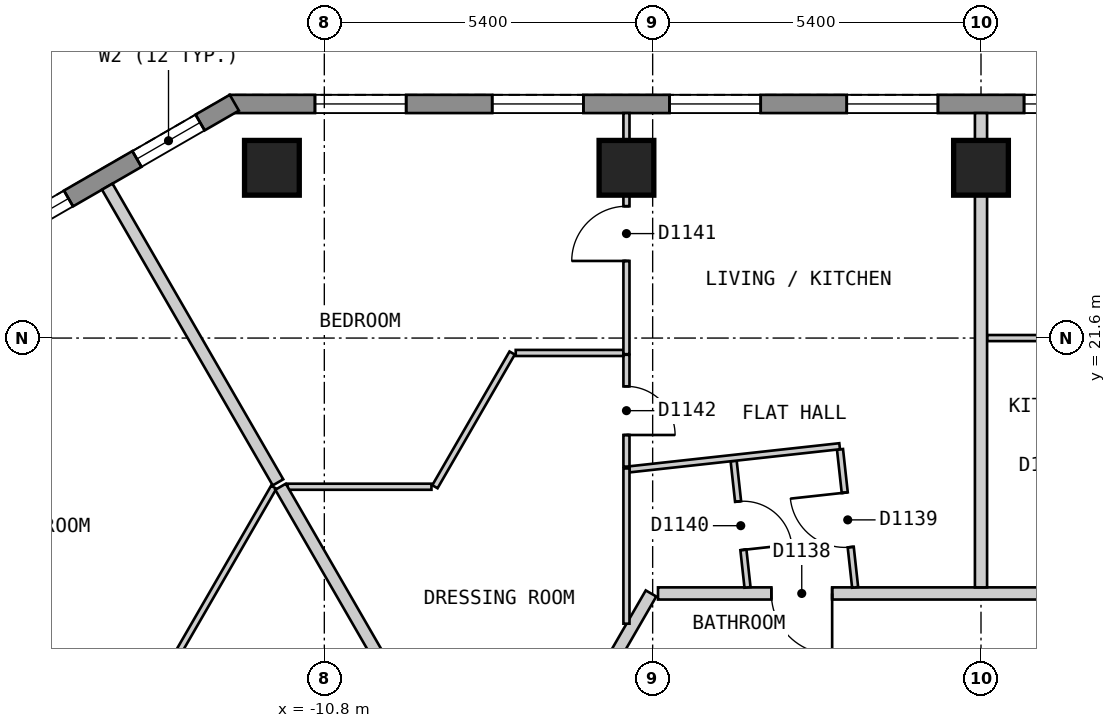
"""IFC4 building model, lengths in metres.
Left out: names, types, materials, properties, quantities, classifications, styles, units other than length and angle.
Written with IfcOpenShell. Run it as: python <this file> out.ifc"""

import sys

from ifc_helpers import new_model, si_unit, direction, frame, frame_2d, origin, origin_2d, place, context, subcontext, project, spatial, polyline, rectangle, outline, extrude, element, fill, save


model = new_model("IFC4")
c1 = context("Model", 3, precision=1e-05, world=origin(), true_north=direction((0.0, 1.0)))
c2 = subcontext(c1, "Body", "Model", "MODEL_VIEW")
j1 = project(units=[si_unit("LENGTHUNIT", "METRE"), si_unit("PLANEANGLEUNIT", "RADIAN")], contexts=[c1])
p1 = place(None, origin())
s1 = spatial("IfcSite", under=j1, at=p1, CompositionType="ELEMENT")
p2 = place(p1, origin())
s2 = spatial("IfcBuilding", under=s1, at=p2, CompositionType="ELEMENT")
p3 = place(p2, frame((0.0, 0.0, 150.6)))
s3 = spatial("IfcBuildingStorey", under=s2, at=p3, CompositionType="ELEMENT", Elevation=150.6)
for number, where, z_axis, x_axis in (
    (1, (0.0, 24.4, 0.0), (0.0, 0.0, 1.0), (-1.0, 0.0, 0.0)),
    (2, (-5.831, 24.4, 0.0), (0.0, 0.0, 1.0), (-1.0, 0.0, 0.0)),
    (3, (-11.662, 24.4, 0.0), (0.0, 0.0, 1.0), (-1.0, 0.0, 0.0)),
):
    element("IfcColumn", number, at=place(p3, frame(where, z_axis=z_axis, x_axis=x_axis)), inside=s3, PredefinedType="COLUMN", context=c2, shape_type="SweptSolid", body=[
        extrude(rectangle(XDim=0.9, YDim=0.9, at=origin_2d()), origin(), (0.0, 0.0, 1.0), 3.0),
    ])
p4 = place(p3, frame((12.355, 25.45, 0.0), z_axis=(0.0, 0.0, 1.0), x_axis=(-1.0, 0.0, 0.0)))
e4 = element("IfcWall", 4, at=p4, inside=s3, PredefinedType="SOLIDWALL", context=c2, shape_type="SweptSolid", body=[
    extrude(outline(polyline([(0.0, -0.15), (24.71, -0.15), (24.63, 0.15), (0.08, 0.15), (0.0, -0.15)])), origin(), (0.0, 0.0, 1.0), 2.6),
])
p5 = place(p4, frame((1.401, 0.0, 0.15)))
e5 = element("IfcOpeningElement", 5, at=p5, cuts=e4, PredefinedType="OPENING", context=c2, shape_type="SweptSolid", body=[
    extrude(rectangle(XDim=1.5, YDim=2.1, at=frame_2d((0.75, 1.05))), frame((0.0, 0.16, 0.0), z_axis=(0.0, -1.0, 0.0), x_axis=(1.0, 0.0, 0.0)), (0.0, 0.0, 1.0), 0.32),
])
p6 = place(p4, frame((4.316, 0.0, 0.15)))
e6 = element("IfcOpeningElement", 6, at=p6, cuts=e4, PredefinedType="OPENING", context=c2, shape_type="SweptSolid", body=[
    extrude(rectangle(XDim=1.5, YDim=2.1, at=frame_2d((0.75, 1.05))), frame((0.0, 0.16, 0.0), z_axis=(0.0, -1.0, 0.0), x_axis=(1.0, 0.0, 0.0)), (0.0, 0.0, 1.0), 0.32),
])
p7 = place(p4, frame((7.232, 0.0, 0.15)))
e7 = element("IfcOpeningElement", 7, at=p7, cuts=e4, PredefinedType="OPENING", context=c2, shape_type="SweptSolid", body=[
    extrude(rectangle(XDim=1.5, YDim=2.1, at=frame_2d((0.75, 1.05))), frame((0.0, 0.16, 0.0), z_axis=(0.0, -1.0, 0.0), x_axis=(1.0, 0.0, 0.0)), (0.0, 0.0, 1.0), 0.32),
])
p8 = place(p4, frame((10.147, 0.0, 0.15)))
e8 = element("IfcOpeningElement", 8, at=p8, cuts=e4, PredefinedType="OPENING", context=c2, shape_type="SweptSolid", body=[
    extrude(rectangle(XDim=1.5, YDim=2.1, at=frame_2d((0.75, 1.05))), frame((0.0, 0.16, 0.0), z_axis=(0.0, -1.0, 0.0), x_axis=(1.0, 0.0, 0.0)), (0.0, 0.0, 1.0), 0.32),
])
p9 = place(p4, frame((13.063, 0.0, 0.15)))
e9 = element("IfcOpeningElement", 9, at=p9, cuts=e4, PredefinedType="OPENING", context=c2, shape_type="SweptSolid", body=[
    extrude(rectangle(XDim=1.5, YDim=2.1, at=frame_2d((0.75, 1.05))), frame((0.0, 0.16, 0.0), z_axis=(0.0, -1.0, 0.0), x_axis=(1.0, 0.0, 0.0)), (0.0, 0.0, 1.0), 0.32),
])
p10 = place(p4, frame((15.978, 0.0, 0.15)))
e10 = element("IfcOpeningElement", 10, at=p10, cuts=e4, PredefinedType="OPENING", context=c2, shape_type="SweptSolid", body=[
    extrude(rectangle(XDim=1.5, YDim=2.1, at=frame_2d((0.75, 1.05))), frame((0.0, 0.16, 0.0), z_axis=(0.0, -1.0, 0.0), x_axis=(1.0, 0.0, 0.0)), (0.0, 0.0, 1.0), 0.32),
])
p11 = place(p4, frame((18.894, 0.0, 0.15)))
e11 = element("IfcOpeningElement", 11, at=p11, cuts=e4, PredefinedType="OPENING", context=c2, shape_type="SweptSolid", body=[
    extrude(rectangle(XDim=1.5, YDim=2.1, at=frame_2d((0.75, 1.05))), frame((0.0, 0.16, 0.0), z_axis=(0.0, -1.0, 0.0), x_axis=(1.0, 0.0, 0.0)), (0.0, 0.0, 1.0), 0.32),
])
p12 = place(p4, frame((21.809, 0.0, 0.15)))
e12 = element("IfcOpeningElement", 12, at=p12, cuts=e4, PredefinedType="OPENING", context=c2, shape_type="SweptSolid", body=[
    extrude(rectangle(XDim=1.5, YDim=2.1, at=frame_2d((0.75, 1.05))), frame((0.0, 0.16, 0.0), z_axis=(0.0, -1.0, 0.0), x_axis=(1.0, 0.0, 0.0)), (0.0, 0.0, 1.0), 0.32),
])
p13 = place(p3, frame((-12.28, 25.47, 0.0), z_axis=(0.0, 0.0, 1.0), x_axis=(-0.866022959057, -0.500004234368, 0.0)))
e13 = element("IfcWall", 13, at=p13, inside=s3, PredefinedType="SOLIDWALL", context=c2, shape_type="SweptSolid", body=[
    extrude(outline(polyline([(0.0, -0.15), (5.0, -0.15), (4.92, 0.15), (0.08, 0.15), (0.0, -0.15)])), origin(), (0.0, 0.0, 1.0), 2.6),
])
p14 = place(p13, frame((0.65, 0.0, 0.15)))
e14 = element("IfcOpeningElement", 14, at=p14, cuts=e13, PredefinedType="OPENING", context=c2, shape_type="SweptSolid", body=[
    extrude(rectangle(XDim=1.2, YDim=2.1, at=frame_2d((0.6, 1.05))), frame((0.0, 0.16, 0.0), z_axis=(0.0, -1.0, 0.0), x_axis=(1.0, 0.0, 0.0)), (0.0, 0.0, 1.0), 0.32),
])
p15 = place(p13, frame((3.149, 0.0, 0.15)))
e15 = element("IfcOpeningElement", 15, at=p15, cuts=e13, PredefinedType="OPENING", context=c2, shape_type="SweptSolid", body=[
    extrude(rectangle(XDim=1.2, YDim=2.1, at=frame_2d((0.6, 1.05))), frame((0.0, 0.16, 0.0), z_axis=(0.0, -1.0, 0.0), x_axis=(1.0, 0.0, 0.0)), (0.0, 0.0, 1.0), 0.32),
])
p16 = place(p3, frame((-5.312, 17.4, 0.0), z_axis=(0.0, 0.0, 1.0), x_axis=(1.0, 0.0, 0.0)))
e16 = element("IfcWall", 16, at=p16, inside=s3, PredefinedType="PARTITIONING", context=c2, shape_type="SweptSolid", body=[
    extrude(rectangle(XDim=10.739, YDim=0.2, at=frame_2d((5.37, 0.0))), origin(), (0.0, 0.0, 1.0), 2.6),
])
p17 = place(p16, frame((7.538, 0.0, 0.0)))
e17 = element("IfcOpeningElement", 17, at=p17, cuts=e16, PredefinedType="OPENING", context=c2, shape_type="SweptSolid", body=[
    extrude(rectangle(XDim=1.0, YDim=2.1, at=frame_2d((0.5, 1.05))), frame((0.0, 0.11, 0.0), z_axis=(0.0, -1.0, 0.0), x_axis=(1.0, 0.0, 0.0)), (0.0, 0.0, 1.0), 0.22),
])
p18 = place(p16, frame((1.864, 0.0, 0.0)))
e18 = element("IfcOpeningElement", 18, at=p18, cuts=e16, PredefinedType="OPENING", context=c2, shape_type="SweptSolid", body=[
    extrude(rectangle(XDim=1.0, YDim=2.1, at=frame_2d((0.5, 1.05))), frame((0.0, 0.11, 0.0), z_axis=(0.0, -1.0, 0.0), x_axis=(1.0, 0.0, 0.0)), (0.0, 0.0, 1.0), 0.22),
])
p19 = place(p3, frame((-6.697, 15.2, 0.0), z_axis=(0.0, 0.0, 1.0), x_axis=(0.499963722229, 0.866046347752, 0.0)))
e19 = element("IfcWall", 19, at=p19, inside=s3, PredefinedType="PARTITIONING", context=c2, shape_type="SweptSolid", body=[
    extrude(rectangle(XDim=2.54, YDim=0.2, at=frame_2d((1.27, 0.0))), origin(), (0.0, 0.0, 1.0), 2.6),
])
p20 = place(p3, frame((-2.319, 19.77, 0.0), z_axis=(0.0, 0.0, 1.0), x_axis=(0.109046821538, -0.994036614372, 0.0)))
e20 = element("IfcWall", 20, at=p20, inside=s3, PredefinedType="PARTITIONING", context=c2, shape_type="SweptSolid", body=[
    extrude(rectangle(XDim=2.284, YDim=0.1, at=frame_2d((1.142, 0.0))), origin(), (0.0, 0.0, 1.0), 2.6),
])
p21 = place(p20, frame((0.717, 0.0, 0.0)))
e21 = element("IfcOpeningElement", 21, at=p21, cuts=e20, PredefinedType="OPENING", context=c2, shape_type="SweptSolid", body=[
    extrude(rectangle(XDim=0.9, YDim=2.1, at=frame_2d((0.45, 1.05))), frame((0.0, 0.06, 0.0), z_axis=(0.0, -1.0, 0.0), x_axis=(1.0, 0.0, 0.0)), (0.0, 0.0, 1.0), 0.12),
])
p22 = place(p3, frame((-4.068, 19.579, 0.0), z_axis=(0.0, 0.0, 1.0), x_axis=(0.109022161139, -0.994039319333, 0.0)))
e22 = element("IfcWall", 22, at=p22, inside=s3, PredefinedType="PARTITIONING", context=c2, shape_type="SweptSolid", body=[
    extrude(rectangle(XDim=2.092, YDim=0.1, at=frame_2d((1.046, 0.0))), origin(), (0.0, 0.0, 1.0), 2.6),
])
p23 = place(p22, frame((0.671, 0.0, 0.0)))
e23 = element("IfcOpeningElement", 23, at=p23, cuts=e22, PredefinedType="OPENING", context=c2, shape_type="SweptSolid", body=[
    extrude(rectangle(XDim=0.8, YDim=2.1, at=frame_2d((0.4, 1.05))), frame((0.0, 0.06, 0.0), z_axis=(0.0, -1.0, 0.0), x_axis=(1.0, 0.0, 0.0)), (0.0, 0.0, 1.0), 0.12),
])
p24 = place(p3, frame((-5.831, 21.325, 0.0), z_axis=(0.0, 0.0, 1.0), x_axis=(0.0, -1.0, 0.0)))
e24 = element("IfcWall", 24, at=p24, inside=s3, PredefinedType="PARTITIONING", context=c2, shape_type="SweptSolid", body=[
    extrude(rectangle(XDim=1.839, YDim=0.1, at=frame_2d((0.919, 0.0))), origin(), (0.0, 0.0, 1.0), 2.6),
])
p25 = place(p24, frame((0.519, 0.0, 0.0)))
e25 = element("IfcOpeningElement", 25, at=p25, cuts=e24, PredefinedType="OPENING", context=c2, shape_type="SweptSolid", body=[
    extrude(rectangle(XDim=0.8, YDim=2.1, at=frame_2d((0.4, 1.05))), frame((0.0, 0.06, 0.0), z_axis=(0.0, -1.0, 0.0), x_axis=(1.0, 0.0, 0.0)), (0.0, 0.0, 1.0), 0.12),
])
p26 = place(p3, frame((-19.514, 17.599, 0.0), z_axis=(0.0, 0.0, 1.0), x_axis=(0.866007554612, -0.500030914399, 0.0)))
e26 = element("IfcWall", 26, at=p26, inside=s3, PredefinedType="PARTITIONING", context=c2, shape_type="SweptSolid", body=[
    extrude(rectangle(XDim=6.052, YDim=0.1, at=frame_2d((3.026, 0.0))), origin(), (0.0, 0.0, 1.0), 2.6),
])
p27 = place(p26, frame((2.576, 0.0, 0.0)))
e27 = element("IfcOpeningElement", 27, at=p27, cuts=e26, PredefinedType="OPENING", context=c2, shape_type="SweptSolid", body=[
    extrude(rectangle(XDim=0.9, YDim=2.1, at=frame_2d((0.45, 1.05))), frame((0.0, 0.06, 0.0), z_axis=(0.0, -1.0, 0.0), x_axis=(1.0, 0.0, 0.0)), (0.0, 0.0, 1.0), 0.12),
])
p28 = place(p3, frame((-11.405, 19.155, 0.0), z_axis=(0.0, 0.0, 1.0), x_axis=(1.0, 0.0, 0.0)))
e28 = element("IfcWall", 28, at=p28, inside=s3, PredefinedType="PARTITIONING", context=c2, shape_type="SweptSolid", body=[
    extrude(rectangle(XDim=2.367, YDim=0.1, at=frame_2d((1.184, 0.0))), origin(), (0.0, 0.0, 1.0), 2.6),
])
p29 = place(p3, frame((-7.652, 21.355, 0.0), z_axis=(0.0, 0.0, 1.0), x_axis=(1.0, 0.0, 0.0)))
e29 = element("IfcWall", 29, at=p29, inside=s3, PredefinedType="PARTITIONING", context=c2, shape_type="SweptSolid", body=[
    extrude(rectangle(XDim=1.771, YDim=0.1, at=frame_2d((0.885, 0.0))), origin(), (0.0, 0.0, 1.0), 2.6),
])
p30 = place(p3, frame((0.1, 21.6, 0.0), z_axis=(0.0, 0.0, 1.0), x_axis=(1.0, 0.0, 0.0)))
e30 = element("IfcWall", 30, at=p30, inside=s3, PredefinedType="PARTITIONING", context=c2, shape_type="SweptSolid", body=[
    extrude(rectangle(XDim=7.752, YDim=0.1, at=frame_2d((3.876, 0.0))), origin(), (0.0, 0.0, 1.0), 2.6),
])
p31 = place(p30, frame((2.634, 0.0, 0.0)))
e31 = element("IfcOpeningElement", 31, at=p31, cuts=e30, PredefinedType="OPENING", context=c2, shape_type="SweptSolid", body=[
    extrude(rectangle(XDim=0.9, YDim=2.1, at=frame_2d((0.45, 1.05))), frame((0.0, 0.06, 0.0), z_axis=(0.0, -1.0, 0.0), x_axis=(1.0, 0.0, 0.0)), (0.0, 0.0, 1.0), 0.12),
])
p32 = place(p3, frame((-8.981, 19.155, 0.0), z_axis=(0.0, 0.0, 1.0), x_axis=(0.500130227609, 0.865950203783, 0.0)))
e32 = element("IfcWall", 32, at=p32, inside=s3, PredefinedType="PARTITIONING", context=c2, shape_type="SweptSolid", body=[
    extrude(rectangle(XDim=2.539, YDim=0.1, at=frame_2d((1.27, 0.0))), origin(), (0.0, 0.0, 1.0), 2.6),
])
p33 = place(p3, frame((-22.398, 0.499, 0.0), z_axis=(0.0, 0.0, 1.0), x_axis=(0.499981561717, 0.866036048871, 0.0)))
e33 = element("IfcWall", 33, at=p33, inside=s3, PredefinedType="PARTITIONING", context=c2, shape_type="SweptSolid", body=[
    extrude(rectangle(XDim=21.532, YDim=0.1, at=frame_2d((10.766, 0.0))), origin(), (0.0, 0.0, 1.0), 2.6),
])
p34 = place(p33, frame((13.049, 0.0, 0.0)))
e34 = element("IfcOpeningElement", 34, at=p34, cuts=e33, PredefinedType="OPENING", context=c2, shape_type="SweptSolid", body=[
    extrude(rectangle(XDim=0.9, YDim=2.1, at=frame_2d((0.45, 1.05))), frame((0.0, 0.06, 0.0), z_axis=(0.0, -1.0, 0.0), x_axis=(1.0, 0.0, 0.0)), (0.0, 0.0, 1.0), 0.12),
])
p35 = place(p33, frame((2.183, 0.0, 0.0)))
e35 = element("IfcOpeningElement", 35, at=p35, cuts=e33, PredefinedType="OPENING", context=c2, shape_type="SweptSolid", body=[
    extrude(rectangle(XDim=0.8, YDim=2.1, at=frame_2d((0.4, 1.05))), frame((0.0, 0.06, 0.0), z_axis=(0.0, -1.0, 0.0), x_axis=(1.0, 0.0, 0.0)), (0.0, 0.0, 1.0), 0.12),
])
p36 = place(p3, frame((-5.781, 19.441, 0.0), z_axis=(0.0, 0.0, 1.0), x_axis=(0.994005576935, 0.109329378588, 0.0)))
e36 = element("IfcWall", 36, at=p36, inside=s3, PredefinedType="PARTITIONING", context=c2, shape_type="SweptSolid", body=[
    extrude(rectangle(XDim=3.477, YDim=0.1, at=frame_2d((1.738, 0.0))), origin(), (0.0, 0.0, 1.0), 2.6),
])
p37 = place(p3, frame((-5.831, 16.903, 0.0), z_axis=(0.0, 0.0, 1.0), x_axis=(0.0, 1.0, 0.0)))
e37 = element("IfcWall", 37, at=p37, inside=s3, PredefinedType="PARTITIONING", context=c2, shape_type="SweptSolid", body=[
    extrude(rectangle(XDim=2.553, YDim=0.1, at=frame_2d((1.276, 0.0))), origin(), (0.0, 0.0, 1.0), 2.6),
])
p38 = place(p3, frame((-5.831, 21.335, 0.0), z_axis=(0.0, 0.0, 1.0), x_axis=(0.0, 1.0, 0.0)))
e38 = element("IfcWall", 38, at=p38, inside=s3, PredefinedType="PARTITIONING", context=c2, shape_type="SweptSolid", body=[
    extrude(rectangle(XDim=3.965, YDim=0.1, at=frame_2d((1.982, 0.0))), origin(), (0.0, 0.0, 1.0), 2.6),
])
p39 = place(p38, frame((1.533, 0.0, 0.0)))
e39 = element("IfcOpeningElement", 39, at=p39, cuts=e38, PredefinedType="OPENING", context=c2, shape_type="SweptSolid", body=[
    extrude(rectangle(XDim=0.9, YDim=2.1, at=frame_2d((0.45, 1.05))), frame((0.0, 0.06, 0.0), z_axis=(0.0, -1.0, 0.0), x_axis=(1.0, 0.0, 0.0)), (0.0, 0.0, 1.0), 0.12),
])
p40 = place(p3, frame((-14.37, 24.09, 0.0), z_axis=(0.0, 0.0, 1.0), x_axis=(0.500057386422, -0.865992269183, 0.0)))
e40 = element("IfcWall", 40, at=p40, inside=s3, PredefinedType="PARTITIONING", context=c2, shape_type="SweptSolid", body=[
    extrude(rectangle(XDim=5.615, YDim=0.2, at=frame_2d((2.808, 0.0))), origin(), (0.0, 0.0, 1.0), 2.6),
])
p41 = place(p3, frame((-11.52, 19.155, 0.0), z_axis=(0.0, 0.0, 1.0), x_axis=(0.499916824138, -0.866073420066, 0.0)))
e41 = element("IfcWall", 41, at=p41, inside=s3, PredefinedType="PARTITIONING", context=c2, shape_type="SweptSolid", body=[
    extrude(rectangle(XDim=4.567, YDim=0.2, at=frame_2d((2.283, 0.0))), origin(), (0.0, 0.0, 1.0), 2.6),
])
p42 = place(p3, frame((0.0, 17.5, 0.0), z_axis=(0.0, 0.0, 1.0), x_axis=(0.0, 1.0, 0.0)))
e42 = element("IfcWall", 42, at=p42, inside=s3, PredefinedType="PARTITIONING", context=c2, shape_type="SweptSolid", body=[
    extrude(rectangle(XDim=7.8, YDim=0.2, at=frame_2d((3.9, 0.0))), origin(), (0.0, 0.0, 1.0), 2.6),
])
p43 = place(p8, origin())
e43 = element("IfcWindow", 43, at=p43, inside=s3, PartitioningType="SINGLE_PANEL", PredefinedType="WINDOW", context=c2, shape_type="SweptSolid", body=[
    extrude(rectangle(XDim=1.5, YDim=2.1, at=frame_2d((0.75, 1.05))), frame((0.0, 0.03, 0.0), z_axis=(0.0, -1.0, 0.0), x_axis=(1.0, 0.0, 0.0)), (0.0, 0.0, 1.0), 0.06),
])
fill(e8, e43)
p44 = place(p9, origin())
e44 = element("IfcWindow", 44, at=p44, inside=s3, PartitioningType="SINGLE_PANEL", PredefinedType="WINDOW", context=c2, shape_type="SweptSolid", body=[
    extrude(rectangle(XDim=1.5, YDim=2.1, at=frame_2d((0.75, 1.05))), frame((0.0, 0.03, 0.0), z_axis=(0.0, -1.0, 0.0), x_axis=(1.0, 0.0, 0.0)), (0.0, 0.0, 1.0), 0.06),
])
fill(e9, e44)
p45 = place(p10, origin())
e45 = element("IfcWindow", 45, at=p45, inside=s3, PartitioningType="SINGLE_PANEL", PredefinedType="WINDOW", context=c2, shape_type="SweptSolid", body=[
    extrude(rectangle(XDim=1.5, YDim=2.1, at=frame_2d((0.75, 1.05))), frame((0.0, 0.03, 0.0), z_axis=(0.0, -1.0, 0.0), x_axis=(1.0, 0.0, 0.0)), (0.0, 0.0, 1.0), 0.06),
])
fill(e10, e45)
p46 = place(p11, origin())
e46 = element("IfcWindow", 46, at=p46, inside=s3, PartitioningType="SINGLE_PANEL", PredefinedType="WINDOW", context=c2, shape_type="SweptSolid", body=[
    extrude(rectangle(XDim=1.5, YDim=2.1, at=frame_2d((0.75, 1.05))), frame((0.0, 0.03, 0.0), z_axis=(0.0, -1.0, 0.0), x_axis=(1.0, 0.0, 0.0)), (0.0, 0.0, 1.0), 0.06),
])
fill(e11, e46)
p47 = place(p12, origin())
e47 = element("IfcWindow", 47, at=p47, inside=s3, PartitioningType="SINGLE_PANEL", PredefinedType="WINDOW", context=c2, shape_type="SweptSolid", body=[
    extrude(rectangle(XDim=1.5, YDim=2.1, at=frame_2d((0.75, 1.05))), frame((0.0, 0.03, 0.0), z_axis=(0.0, -1.0, 0.0), x_axis=(1.0, 0.0, 0.0)), (0.0, 0.0, 1.0), 0.06),
])
fill(e12, e47)
p48 = place(p14, origin())
e48 = element("IfcWindow", 48, at=p48, inside=s3, PartitioningType="SINGLE_PANEL", PredefinedType="WINDOW", context=c2, shape_type="SweptSolid", body=[
    extrude(rectangle(XDim=1.2, YDim=2.1, at=frame_2d((0.6, 1.05))), frame((0.0, 0.03, 0.0), z_axis=(0.0, -1.0, 0.0), x_axis=(1.0, 0.0, 0.0)), (0.0, 0.0, 1.0), 0.06),
])
fill(e14, e48)
p49 = place(p15, origin())
e49 = element("IfcWindow", 49, at=p49, inside=s3, PartitioningType="SINGLE_PANEL", PredefinedType="WINDOW", context=c2, shape_type="SweptSolid", body=[
    extrude(rectangle(XDim=1.2, YDim=2.1, at=frame_2d((0.6, 1.05))), frame((0.0, 0.03, 0.0), z_axis=(0.0, -1.0, 0.0), x_axis=(1.0, 0.0, 0.0)), (0.0, 0.0, 1.0), 0.06),
])
fill(e15, e49)
p50 = place(p18, origin())
e50 = element("IfcDoor", 50, at=p50, inside=s3, OperationType="SINGLE_SWING_RIGHT", PredefinedType="DOOR", context=c2, shape_type="SweptSolid", body=[
    extrude(rectangle(XDim=1.0, YDim=2.1, at=frame_2d((0.5, 1.05))), frame((0.0, 0.025, 0.0), z_axis=(0.0, -1.0, 0.0), x_axis=(1.0, 0.0, 0.0)), (0.0, 0.0, 1.0), 0.05),
])
fill(e18, e50)
p51 = place(p21, origin())
e51 = element("IfcDoor", 51, at=p51, inside=s3, OperationType="SINGLE_SWING_LEFT", PredefinedType="DOOR", context=c2, shape_type="SweptSolid", body=[
    extrude(rectangle(XDim=0.9, YDim=2.1, at=frame_2d((0.45, 1.05))), frame((0.0, 0.025, 0.0), z_axis=(0.0, -1.0, 0.0), x_axis=(1.0, 0.0, 0.0)), (0.0, 0.0, 1.0), 0.05),
])
fill(e21, e51)
p52 = place(p23, origin())
e52 = element("IfcDoor", 52, at=p52, inside=s3, OperationType="SINGLE_SWING_RIGHT", PredefinedType="DOOR", context=c2, shape_type="SweptSolid", body=[
    extrude(rectangle(XDim=0.8, YDim=2.1, at=frame_2d((0.4, 1.05))), frame((0.0, 0.025, 0.0), z_axis=(0.0, -1.0, 0.0), x_axis=(1.0, 0.0, 0.0)), (0.0, 0.0, 1.0), 0.05),
])
fill(e23, e52)
p53 = place(p39, origin())
e53 = element("IfcDoor", 53, at=p53, inside=s3, OperationType="SINGLE_SWING_LEFT", PredefinedType="DOOR", context=c2, shape_type="SweptSolid", body=[
    extrude(rectangle(XDim=0.9, YDim=2.1, at=frame_2d((0.45, 1.05))), frame((0.0, 0.025, 0.0), z_axis=(0.0, -1.0, 0.0), x_axis=(1.0, 0.0, 0.0)), (0.0, 0.0, 1.0), 0.05),
])
fill(e39, e53)
p54 = place(p25, origin())
e54 = element("IfcDoor", 54, at=p54, inside=s3, OperationType="SINGLE_SWING_RIGHT", PredefinedType="DOOR", context=c2, shape_type="SweptSolid", body=[
    extrude(rectangle(XDim=0.8, YDim=2.1, at=frame_2d((0.4, 1.05))), frame((0.0, 0.025, 0.0), z_axis=(0.0, -1.0, 0.0), x_axis=(1.0, 0.0, 0.0)), (0.0, 0.0, 1.0), 0.05),
])
fill(e25, e54)
save(model, sys.argv[1])
